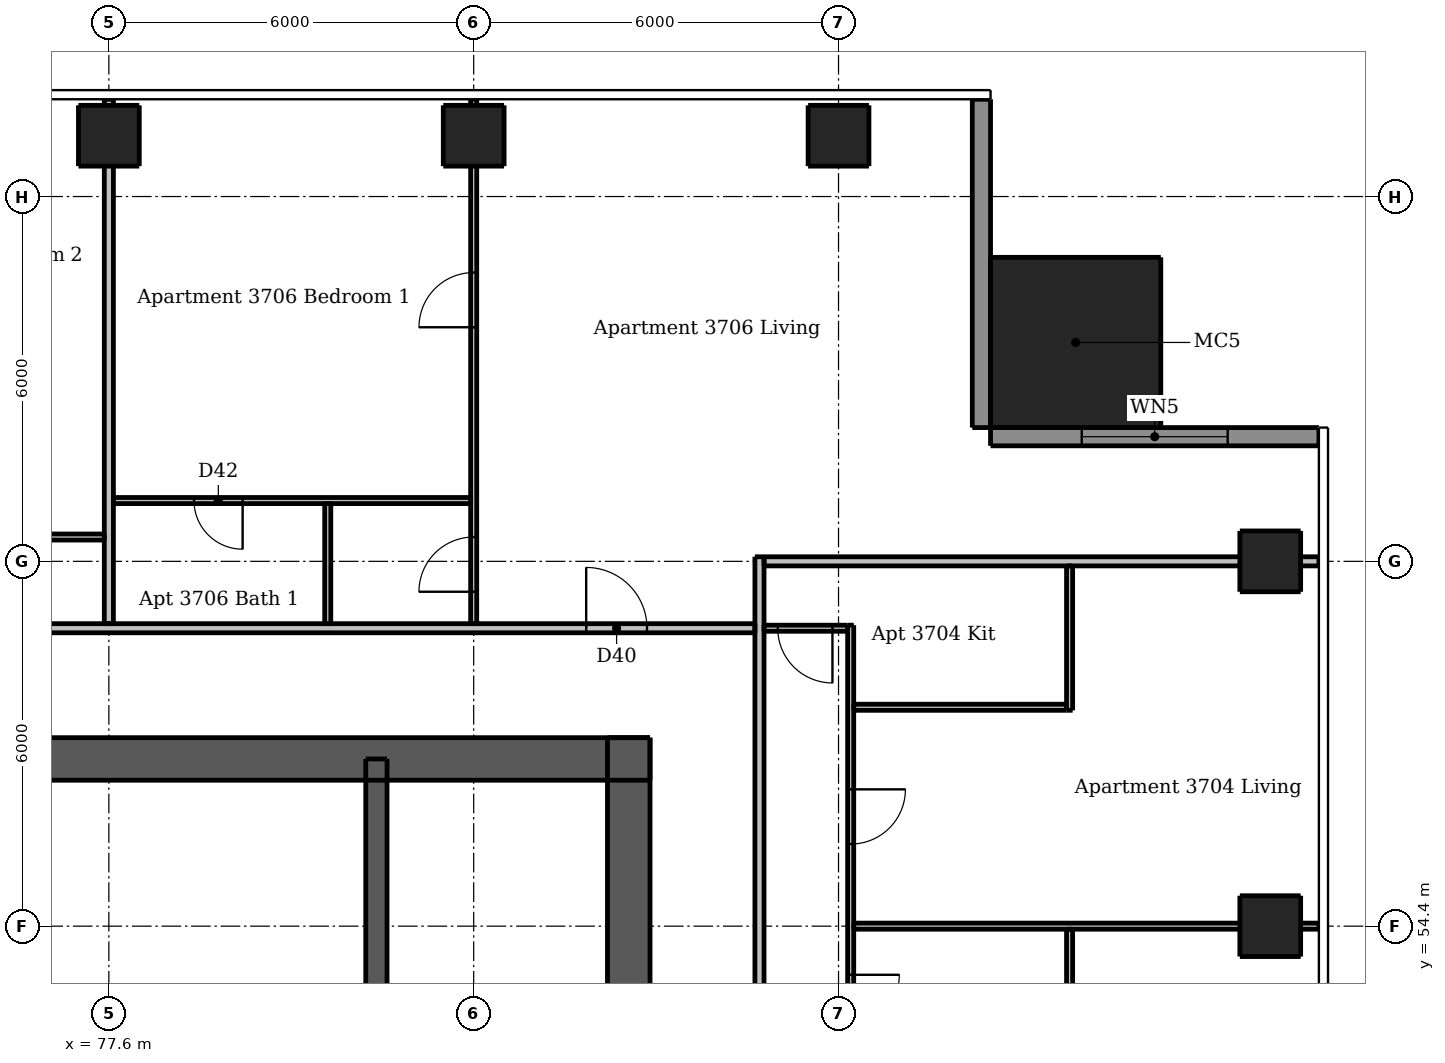
"""IFC4 building model, lengths in metres.
Left out: names, types, materials, properties, quantities, classifications, styles, units other than length and angle.
Written with IfcOpenShell. Run it as: python <this file> out.ifc"""

import sys

from ifc_helpers import new_model, si_unit, direction, frame, frame_2d, origin, origin_2d, place, context, subcontext, project, spatial, rectangle, extrude, element, fill, save


model = new_model("IFC4")
c1 = context("Model", 3, precision=1e-05, world=origin(), true_north=direction((0.0, 1.0)))
c2 = subcontext(c1, "Body", "Model", "MODEL_VIEW")
j1 = project(units=[si_unit("LENGTHUNIT", "METRE"), si_unit("PLANEANGLEUNIT", "RADIAN")], contexts=[c1])
p1 = place(None, origin())
s1 = spatial("IfcSite", under=j1, at=p1, CompositionType="ELEMENT")
p2 = place(p1, origin())
s2 = spatial("IfcBuilding", under=s1, at=p2, CompositionType="ELEMENT")
p3 = place(p2, frame((0.0, 0.0, 140.5)))
s3 = spatial("IfcBuildingStorey", under=s2, at=p3, CompositionType="ELEMENT", Elevation=140.5)
p4 = place(p3, frame((62.5, 57.15, 0.0), z_axis=(0.0, 0.0, 1.0), x_axis=(1.0, 0.0, 0.0)))
e1 = element("IfcWall", 1, at=p4, inside=s3, PredefinedType="SHEAR", context=c2, shape_type="SweptSolid", body=[
    extrude(rectangle(XDim=24.0, YDim=0.7, at=frame_2d((12.0, 0.0))), origin(), (0.0, 0.0, 1.0), 3.05),
])
p5 = place(p4, frame((20.938, 0.0, 0.0)))
e2 = element("IfcOpeningElement", 2, at=p5, cuts=e1, PredefinedType="OPENING", context=c2, shape_type="SweptSolid", body=[
    extrude(rectangle(XDim=1.1, YDim=2.1, at=frame_2d((0.55, 1.05))), frame((0.0, 0.36, 0.0), z_axis=(0.0, -1.0, 0.0), x_axis=(1.0, 0.0, 0.0)), (0.0, 0.0, 1.0), 0.72),
])
p6 = place(p4, frame((1.962, 0.0, 0.0)))
e3 = element("IfcOpeningElement", 3, at=p6, cuts=e1, PredefinedType="OPENING", context=c2, shape_type="SweptSolid", body=[
    extrude(rectangle(XDim=1.1, YDim=2.1, at=frame_2d((0.55, 1.05))), frame((0.0, 0.36, 0.0), z_axis=(0.0, -1.0, 0.0), x_axis=(1.0, 0.0, 0.0)), (0.0, 0.0, 1.0), 0.72),
])
p7 = place(p4, frame((6.423, 0.0, 0.0)))
e4 = element("IfcOpeningElement", 4, at=p7, cuts=e1, PredefinedType="OPENING", context=c2, shape_type="SweptSolid", body=[
    extrude(rectangle(XDim=0.9, YDim=2.1, at=frame_2d((0.45, 1.05))), frame((0.0, 0.36, 0.0), z_axis=(0.0, -1.0, 0.0), x_axis=(1.0, 0.0, 0.0)), (0.0, 0.0, 1.0), 0.72),
])
p8 = place(p4, frame((13.748, 0.0, 0.0)))
e5 = element("IfcOpeningElement", 5, at=p8, cuts=e1, PredefinedType="OPENING", context=c2, shape_type="SweptSolid", body=[
    extrude(rectangle(XDim=0.9, YDim=2.1, at=frame_2d((0.45, 1.05))), frame((0.0, 0.36, 0.0), z_axis=(0.0, -1.0, 0.0), x_axis=(1.0, 0.0, 0.0)), (0.0, 0.0, 1.0), 0.72),
])
p9 = place(p3, frame((86.15, 33.5, 0.0), z_axis=(0.0, 0.0, 1.0), x_axis=(0.0, 1.0, 0.0)))
e6 = element("IfcWall", 6, at=p9, inside=s3, PredefinedType="SHEAR", context=c2, shape_type="SweptSolid", body=[
    extrude(rectangle(XDim=24.0, YDim=0.7, at=frame_2d((12.0, 0.0))), origin(), (0.0, 0.0, 1.0), 3.05),
])
p10 = place(p9, frame((11.2, 0.0, 0.0)))
e7 = element("IfcOpeningElement", 7, at=p10, cuts=e6, PredefinedType="OPENING", context=c2, shape_type="SweptSolid", body=[
    extrude(rectangle(XDim=1.6, YDim=2.1, at=frame_2d((0.8, 1.05))), frame((0.0, 0.36, 0.0), z_axis=(0.0, -1.0, 0.0), x_axis=(1.0, 0.0, 0.0)), (0.0, 0.0, 1.0), 0.72),
])
p11 = place(p3, frame((82.0, 47.1, 0.0), z_axis=(0.0, 0.0, 1.0), x_axis=(0.0, 1.0, 0.0)))
e8 = element("IfcWall", 8, at=p11, inside=s3, PredefinedType="SHEAR", context=c2, shape_type="SweptSolid", body=[
    extrude(rectangle(XDim=10.05, YDim=0.35, at=frame_2d((5.025, 0.0))), origin(), (0.0, 0.0, 1.0), 3.05),
])
for number, where, z_axis, x_axis in (
    (9, (96.7, 54.4, 0.0), (0.0, 0.0, 1.0), (1.0, 0.0, 0.0)),
    (10, (96.7, 60.4, 0.0), (0.0, 0.0, 1.0), (1.0, 0.0, 0.0)),
    (11, (77.6, 67.4, 0.0), (0.0, 0.0, 1.0), (1.0, 0.0, 0.0)),
    (12, (83.6, 67.4, 0.0), (0.0, 0.0, 1.0), (1.0, 0.0, 0.0)),
    (13, (89.6, 67.4, 0.0), (0.0, 0.0, 1.0), (1.0, 0.0, 0.0)),
):
    element("IfcColumn", number, at=place(p3, frame(where, z_axis=z_axis, x_axis=x_axis)), inside=s3, PredefinedType="COLUMN", context=c2, shape_type="SweptSolid", body=[
        extrude(rectangle(XDim=1.0, YDim=1.0, at=origin_2d()), origin(), (0.0, 0.0, 1.0), 3.05),
    ])
p12 = place(p3, frame((93.5, 64.0, 0.0), z_axis=(0.0, 0.0, 1.0), x_axis=(1.0, 0.0, 0.0)))
e14 = element("IfcColumn", 14, at=p12, inside=s3, PredefinedType="COLUMN", context=c2, shape_type="SweptSolid", body=[
    extrude(rectangle(XDim=2.8, YDim=2.8, at=origin_2d()), origin(), (0.0, 0.0, 1.0), 3.3),
])
p13 = place(p3, frame((97.5, 62.45, 0.0), z_axis=(0.0, 0.0, 1.0), x_axis=(-1.0, 0.0, 0.0)))
e15 = element("IfcWall", 15, at=p13, inside=s3, PredefinedType="SOLIDWALL", context=c2, shape_type="SweptSolid", body=[
    extrude(rectangle(XDim=5.4, YDim=0.3, at=frame_2d((2.7, 0.0))), origin(), (0.0, 0.0, 1.0), 3.05),
])
p14 = place(p13, frame((1.5, 0.0, 0.15)))
e16 = element("IfcOpeningElement", 16, at=p14, cuts=e15, PredefinedType="OPENING", context=c2, shape_type="SweptSolid", body=[
    extrude(rectangle(XDim=2.4, YDim=2.1, at=frame_2d((1.2, 1.05))), frame((0.0, 0.16, 0.0), z_axis=(0.0, -1.0, 0.0), x_axis=(1.0, 0.0, 0.0)), (0.0, 0.0, 1.0), 0.32),
])
p15 = place(p3, frame((91.95, 62.6, 0.0), z_axis=(0.0, 0.0, 1.0), x_axis=(0.0, 1.0, 0.0)))
e17 = element("IfcWall", 17, at=p15, inside=s3, PredefinedType="SOLIDWALL", context=c2, shape_type="SweptSolid", body=[
    extrude(rectangle(XDim=5.4, YDim=0.3, at=frame_2d((2.7, 0.0))), origin(), (0.0, 0.0, 1.0), 3.05),
])
p16 = place(p3, frame((81.2, 59.375, 0.0), z_axis=(0.0, 0.0, 1.0), x_axis=(0.0, 1.0, 0.0)))
e18 = element("IfcWall", 18, at=p16, inside=s3, PredefinedType="PARTITIONING", context=c2, shape_type="SweptSolid", body=[
    extrude(rectangle(XDim=1.975, YDim=0.1, at=frame_2d((0.988, 0.0))), origin(), (0.0, 0.0, 1.0), 3.05),
])
p17 = place(p3, frame((83.6, 59.375, 0.0), z_axis=(0.0, 0.0, 1.0), x_axis=(0.0, 1.0, 0.0)))
e19 = element("IfcWall", 19, at=p17, inside=s3, PredefinedType="PARTITIONING", context=c2, shape_type="SweptSolid", body=[
    extrude(rectangle(XDim=8.625, YDim=0.1, at=frame_2d((4.312, 0.0))), origin(), (0.0, 0.0, 1.0), 2.516),
])
p18 = place(p17, frame((0.525, 0.0, 0.0)))
e20 = element("IfcOpeningElement", 20, at=p18, cuts=e19, PredefinedType="OPENING", context=c2, shape_type="SweptSolid", body=[
    extrude(rectangle(XDim=0.9, YDim=2.1, at=frame_2d((0.45, 1.05))), frame((0.0, 0.06, 0.0), z_axis=(0.0, -1.0, 0.0), x_axis=(1.0, 0.0, 0.0)), (0.0, 0.0, 1.0), 0.12),
])
p19 = place(p17, frame((4.875, 0.0, 0.0)))
e21 = element("IfcOpeningElement", 21, at=p19, cuts=e19, PredefinedType="OPENING", context=c2, shape_type="SweptSolid", body=[
    extrude(rectangle(XDim=0.9, YDim=2.1, at=frame_2d((0.45, 1.05))), frame((0.0, 0.06, 0.0), z_axis=(0.0, -1.0, 0.0), x_axis=(1.0, 0.0, 0.0)), (0.0, 0.0, 1.0), 0.12),
])
p20 = place(p3, frame((89.8, 59.35, 0.0), z_axis=(0.0, 0.0, 1.0), x_axis=(0.0, -1.0, 0.0)))
e22 = element("IfcWall", 22, at=p20, inside=s3, PredefinedType="PARTITIONING", context=c2, shape_type="SweptSolid", body=[
    extrude(rectangle(XDim=19.775, YDim=0.1, at=frame_2d((9.888, 0.0))), origin(), (0.0, 0.0, 1.0), 3.05),
])
p21 = place(p20, frame((2.7, 0.0, 0.0)))
e23 = element("IfcOpeningElement", 23, at=p21, cuts=e22, PredefinedType="OPENING", context=c2, shape_type="SweptSolid", body=[
    extrude(rectangle(XDim=0.9, YDim=2.1, at=frame_2d((0.45, 1.05))), frame((0.0, 0.06, 0.0), z_axis=(0.0, -1.0, 0.0), x_axis=(1.0, 0.0, 0.0)), (0.0, 0.0, 1.0), 0.12),
])
p22 = place(p20, frame((17.6, 0.0, 0.0)))
e24 = element("IfcOpeningElement", 24, at=p22, cuts=e22, PredefinedType="OPENING", context=c2, shape_type="SweptSolid", body=[
    extrude(rectangle(XDim=0.9, YDim=2.1, at=frame_2d((0.45, 1.05))), frame((0.0, 0.06, 0.0), z_axis=(0.0, -1.0, 0.0), x_axis=(1.0, 0.0, 0.0)), (0.0, 0.0, 1.0), 0.12),
])
p23 = place(p20, frame((10.15, 0.0, 0.0)))
e25 = element("IfcOpeningElement", 25, at=p23, cuts=e22, PredefinedType="OPENING", context=c2, shape_type="SweptSolid", body=[
    extrude(rectangle(XDim=0.9, YDim=2.1, at=frame_2d((0.45, 1.05))), frame((0.0, 0.06, 0.0), z_axis=(0.0, -1.0, 0.0), x_axis=(1.0, 0.0, 0.0)), (0.0, 0.0, 1.0), 0.12),
])
p24 = place(p20, frame((14.65, 0.0, 0.0)))
e26 = element("IfcOpeningElement", 26, at=p24, cuts=e22, PredefinedType="OPENING", context=c2, shape_type="SweptSolid", body=[
    extrude(rectangle(XDim=0.8, YDim=2.1, at=frame_2d((0.4, 1.05))), frame((0.0, 0.06, 0.0), z_axis=(0.0, -1.0, 0.0), x_axis=(1.0, 0.0, 0.0)), (0.0, 0.0, 1.0), 0.12),
])
p25 = place(p20, frame((5.75, 0.0, 0.0)))
e27 = element("IfcOpeningElement", 27, at=p25, cuts=e22, PredefinedType="OPENING", context=c2, shape_type="SweptSolid", body=[
    extrude(rectangle(XDim=0.8, YDim=2.1, at=frame_2d((0.4, 1.05))), frame((0.0, 0.06, 0.0), z_axis=(0.0, -1.0, 0.0), x_axis=(1.0, 0.0, 0.0)), (0.0, 0.0, 1.0), 0.12),
])
p26 = place(p3, frame((93.4, 51.95, 0.0), z_axis=(0.0, 0.0, 1.0), x_axis=(0.0, 1.0, 0.0)))
e28 = element("IfcWall", 28, at=p26, inside=s3, PredefinedType="PARTITIONING", context=c2, shape_type="SweptSolid", body=[
    extrude(rectangle(XDim=2.4, YDim=0.1, at=frame_2d((1.2, 0.0))), origin(), (0.0, 0.0, 1.0), 3.05),
])
p27 = place(p3, frame((93.4, 57.95, 0.0), z_axis=(0.0, 0.0, 1.0), x_axis=(0.0, 1.0, 0.0)))
e29 = element("IfcWall", 29, at=p27, inside=s3, PredefinedType="PARTITIONING", context=c2, shape_type="SweptSolid", body=[
    extrude(rectangle(XDim=2.375, YDim=0.1, at=frame_2d((1.188, 0.0))), origin(), (0.0, 0.0, 1.0), 3.05),
])
p28 = place(p3, frame((83.55, 61.4, 0.0), z_axis=(0.0, 0.0, 1.0), x_axis=(-1.0, 0.0, 0.0)))
e30 = element("IfcWall", 30, at=p28, inside=s3, PredefinedType="PARTITIONING", context=c2, shape_type="SweptSolid", body=[
    extrude(rectangle(XDim=5.875, YDim=0.1, at=frame_2d((2.938, 0.0))), origin(), (0.0, 0.0, 1.0), 3.05),
])
p29 = place(p28, frame((3.75, 0.0, 0.0)))
e31 = element("IfcOpeningElement", 31, at=p29, cuts=e30, PredefinedType="OPENING", context=c2, shape_type="SweptSolid", body=[
    extrude(rectangle(XDim=0.8, YDim=2.1, at=frame_2d((0.4, 1.05))), frame((0.0, 0.06, 0.0), z_axis=(0.0, -1.0, 0.0), x_axis=(1.0, 0.0, 0.0)), (0.0, 0.0, 1.0), 0.12),
])
p30 = place(p3, frame((60.75, 60.8, 0.0), z_axis=(0.0, 0.0, 1.0), x_axis=(1.0, 0.0, 0.0)))
e32 = element("IfcWall", 32, at=p30, inside=s3, PredefinedType="PARTITIONING", context=c2, shape_type="SweptSolid", body=[
    extrude(rectangle(XDim=16.775, YDim=0.1, at=frame_2d((8.387, 0.0))), origin(), (0.0, 0.0, 1.0), 3.05),
])
p31 = place(p30, frame((3.2, 0.0, 0.0)))
e33 = element("IfcOpeningElement", 33, at=p31, cuts=e32, PredefinedType="OPENING", context=c2, shape_type="SweptSolid", body=[
    extrude(rectangle(XDim=0.9, YDim=2.1, at=frame_2d((0.45, 1.05))), frame((0.0, 0.06, 0.0), z_axis=(0.0, -1.0, 0.0), x_axis=(1.0, 0.0, 0.0)), (0.0, 0.0, 1.0), 0.12),
])
p32 = place(p30, frame((1.1, 0.0, 0.0)))
e34 = element("IfcOpeningElement", 34, at=p32, cuts=e32, PredefinedType="OPENING", context=c2, shape_type="SweptSolid", body=[
    extrude(rectangle(XDim=0.9, YDim=2.1, at=frame_2d((0.45, 1.05))), frame((0.0, 0.06, 0.0), z_axis=(0.0, -1.0, 0.0), x_axis=(1.0, 0.0, 0.0)), (0.0, 0.0, 1.0), 0.12),
])
p33 = place(p30, frame((8.6, 0.0, 0.0)))
e35 = element("IfcOpeningElement", 35, at=p33, cuts=e32, PredefinedType="OPENING", context=c2, shape_type="SweptSolid", body=[
    extrude(rectangle(XDim=0.9, YDim=2.1, at=frame_2d((0.45, 1.05))), frame((0.0, 0.06, 0.0), z_axis=(0.0, -1.0, 0.0), x_axis=(1.0, 0.0, 0.0)), (0.0, 0.0, 1.0), 0.12),
])
p34 = place(p30, frame((14.6, 0.0, 0.0)))
e36 = element("IfcOpeningElement", 36, at=p34, cuts=e32, PredefinedType="OPENING", context=c2, shape_type="SweptSolid", body=[
    extrude(rectangle(XDim=0.9, YDim=2.1, at=frame_2d((0.45, 1.05))), frame((0.0, 0.06, 0.0), z_axis=(0.0, -1.0, 0.0), x_axis=(1.0, 0.0, 0.0)), (0.0, 0.0, 1.0), 0.12),
])
p35 = place(p30, frame((5.65, 0.0, 0.0)))
e37 = element("IfcOpeningElement", 37, at=p35, cuts=e32, PredefinedType="OPENING", context=c2, shape_type="SweptSolid", body=[
    extrude(rectangle(XDim=0.8, YDim=2.1, at=frame_2d((0.4, 1.05))), frame((0.0, 0.06, 0.0), z_axis=(0.0, -1.0, 0.0), x_axis=(1.0, 0.0, 0.0)), (0.0, 0.0, 1.0), 0.12),
])
p36 = place(p30, frame((11.65, 0.0, 0.0)))
e38 = element("IfcOpeningElement", 38, at=p36, cuts=e32, PredefinedType="OPENING", context=c2, shape_type="SweptSolid", body=[
    extrude(rectangle(XDim=0.8, YDim=2.1, at=frame_2d((0.4, 1.05))), frame((0.0, 0.06, 0.0), z_axis=(0.0, -1.0, 0.0), x_axis=(1.0, 0.0, 0.0)), (0.0, 0.0, 1.0), 0.12),
])
p37 = place(p3, frame((89.75, 59.3, 0.0), z_axis=(0.0, 0.0, 1.0), x_axis=(-1.0, 0.0, 0.0)))
e39 = element("IfcWall", 39, at=p37, inside=s3, PredefinedType="PARTITIONING", context=c2, shape_type="SweptSolid", body=[
    extrude(rectangle(XDim=1.375, YDim=0.1, at=frame_2d((0.688, 0.0))), origin(), (0.0, 0.0, 1.0), 3.05),
])
p38 = place(p37, frame((0.25, 0.0, 0.0)))
e40 = element("IfcOpeningElement", 40, at=p38, cuts=e39, PredefinedType="OPENING", context=c2, shape_type="SweptSolid", body=[
    extrude(rectangle(XDim=0.9, YDim=2.1, at=frame_2d((0.45, 1.05))), frame((0.0, 0.06, 0.0), z_axis=(0.0, -1.0, 0.0), x_axis=(1.0, 0.0, 0.0)), (0.0, 0.0, 1.0), 0.12),
])
p39 = place(p3, frame((89.85, 58.0, 0.0), z_axis=(0.0, 0.0, 1.0), x_axis=(1.0, 0.0, 0.0)))
e41 = element("IfcWall", 41, at=p39, inside=s3, PredefinedType="PARTITIONING", context=c2, shape_type="SweptSolid", body=[
    extrude(rectangle(XDim=3.5, YDim=0.1, at=frame_2d((1.75, 0.0))), origin(), (0.0, 0.0, 1.0), 3.05),
])
p40 = place(p3, frame((89.85, 54.4, 0.0), z_axis=(0.0, 0.0, 1.0), x_axis=(1.0, 0.0, 0.0)))
e42 = element("IfcWall", 42, at=p40, inside=s3, PredefinedType="PARTITIONING", context=c2, shape_type="SweptSolid", body=[
    extrude(rectangle(XDim=7.65, YDim=0.1, at=frame_2d((3.825, 0.0))), origin(), (0.0, 0.0, 1.0), 2.516),
])
p41 = place(p3, frame((77.6, 59.375, 0.0), z_axis=(0.0, 0.0, 1.0), x_axis=(0.0, 1.0, 0.0)))
e43 = element("IfcWall", 43, at=p41, inside=s3, PredefinedType="PARTITIONING", context=c2, shape_type="SweptSolid", body=[
    extrude(rectangle(XDim=8.625, YDim=0.15, at=frame_2d((4.312, 0.0))), origin(), (0.0, 0.0, 1.0), 2.516),
])
p42 = place(p3, frame((88.3, 60.475, 0.0), z_axis=(0.0, 0.0, 1.0), x_axis=(0.0, -1.0, 0.0)))
e44 = element("IfcWall", 44, at=p42, inside=s3, PredefinedType="PARTITIONING", context=c2, shape_type="SweptSolid", body=[
    extrude(rectangle(XDim=28.7, YDim=0.15, at=frame_2d((14.35, 0.0))), origin(), (0.0, 0.0, 1.0), 3.05),
])
p43 = place(p42, frame((27.425, 0.0, 0.0)))
e45 = element("IfcOpeningElement", 45, at=p43, cuts=e44, PredefinedType="OPENING", context=c2, shape_type="SweptSolid", body=[
    extrude(rectangle(XDim=1.0, YDim=2.1, at=frame_2d((0.5, 1.05))), frame((0.0, 0.085, 0.0), z_axis=(0.0, -1.0, 0.0), x_axis=(1.0, 0.0, 0.0)), (0.0, 0.0, 1.0), 0.17),
])
p44 = place(p42, frame((10.575, 0.0, 0.0)))
e46 = element("IfcOpeningElement", 46, at=p44, cuts=e44, PredefinedType="OPENING", context=c2, shape_type="SweptSolid", body=[
    extrude(rectangle(XDim=1.0, YDim=2.1, at=frame_2d((0.5, 1.05))), frame((0.0, 0.085, 0.0), z_axis=(0.0, -1.0, 0.0), x_axis=(1.0, 0.0, 0.0)), (0.0, 0.0, 1.0), 0.17),
])
p45 = place(p3, frame((88.375, 60.4, 0.0), z_axis=(0.0, 0.0, 1.0), x_axis=(1.0, 0.0, 0.0)))
e47 = element("IfcWall", 47, at=p45, inside=s3, PredefinedType="PARTITIONING", context=c2, shape_type="SweptSolid", body=[
    extrude(rectangle(XDim=9.125, YDim=0.15, at=frame_2d((4.562, 0.0))), origin(), (0.0, 0.0, 1.0), 2.647),
])
p46 = place(p3, frame((59.675, 59.3, 0.0), z_axis=(0.0, 0.0, 1.0), x_axis=(1.0, 0.0, 0.0)))
e48 = element("IfcWall", 48, at=p46, inside=s3, PredefinedType="PARTITIONING", context=c2, shape_type="SweptSolid", body=[
    extrude(rectangle(XDim=28.55, YDim=0.15, at=frame_2d((14.275, 0.0))), origin(), (0.0, 0.0, 1.0), 3.05),
])
p47 = place(p46, frame((8.975, 0.0, 0.0)))
e49 = element("IfcOpeningElement", 49, at=p47, cuts=e48, PredefinedType="OPENING", context=c2, shape_type="SweptSolid", body=[
    extrude(rectangle(XDim=1.0, YDim=2.1, at=frame_2d((0.5, 1.05))), frame((0.0, 0.085, 0.0), z_axis=(0.0, -1.0, 0.0), x_axis=(1.0, 0.0, 0.0)), (0.0, 0.0, 1.0), 0.17),
])
p48 = place(p46, frame((25.775, 0.0, 0.0)))
e50 = element("IfcOpeningElement", 50, at=p48, cuts=e48, PredefinedType="OPENING", context=c2, shape_type="SweptSolid", body=[
    extrude(rectangle(XDim=1.0, YDim=2.1, at=frame_2d((0.5, 1.05))), frame((0.0, 0.085, 0.0), z_axis=(0.0, -1.0, 0.0), x_axis=(1.0, 0.0, 0.0)), (0.0, 0.0, 1.0), 0.17),
])
p49 = place(p14, origin())
e51 = element("IfcWindow", 51, at=p49, inside=s3, PartitioningType="DOUBLE_PANEL_VERTICAL", PredefinedType="WINDOW", context=c2, shape_type="SweptSolid", body=[
    extrude(rectangle(XDim=2.4, YDim=2.1, at=frame_2d((1.2, 1.05))), frame((0.0, 0.03, 0.0), z_axis=(0.0, -1.0, 0.0), x_axis=(1.0, 0.0, 0.0)), (0.0, 0.0, 1.0), 0.06),
])
fill(e16, e51)
p50 = place(p5, origin())
e52 = element("IfcDoor", 52, at=p50, inside=s3, OperationType="SINGLE_SWING_RIGHT", PredefinedType="DOOR", context=c2, shape_type="SweptSolid", body=[
    extrude(rectangle(XDim=1.1, YDim=2.1, at=frame_2d((0.55, 1.05))), frame((0.0, -0.288, 0.0), z_axis=(0.0, -1.0, 0.0), x_axis=(1.0, 0.0, 0.0)), (0.0, 0.0, 1.0), 0.05),
])
fill(e2, e52)
p51 = place(p8, origin())
e53 = element("IfcDoor", 53, at=p51, inside=s3, OperationType="SINGLE_SWING_RIGHT", PredefinedType="DOOR", context=c2, shape_type="SweptSolid", body=[
    extrude(rectangle(XDim=0.9, YDim=2.1, at=frame_2d((0.45, 1.05))), frame((0.0, -0.288, 0.0), z_axis=(0.0, -1.0, 0.0), x_axis=(1.0, 0.0, 0.0)), (0.0, 0.0, 1.0), 0.05),
])
fill(e5, e53)
p52 = place(p21, origin())
e54 = element("IfcDoor", 54, at=p52, inside=s3, OperationType="SINGLE_SWING_LEFT", PredefinedType="DOOR", context=c2, shape_type="SweptSolid", body=[
    extrude(rectangle(XDim=0.9, YDim=2.1, at=frame_2d((0.45, 1.05))), frame((0.0, 0.025, 0.0), z_axis=(0.0, -1.0, 0.0), x_axis=(1.0, 0.0, 0.0)), (0.0, 0.0, 1.0), 0.05),
])
fill(e23, e54)
p53 = place(p38, origin())
e55 = element("IfcDoor", 55, at=p53, inside=s3, OperationType="SINGLE_SWING_LEFT", PredefinedType="DOOR", context=c2, shape_type="SweptSolid", body=[
    extrude(rectangle(XDim=0.9, YDim=2.1, at=frame_2d((0.45, 1.05))), frame((0.0, 0.025, 0.0), z_axis=(0.0, -1.0, 0.0), x_axis=(1.0, 0.0, 0.0)), (0.0, 0.0, 1.0), 0.05),
])
fill(e40, e55)
p54 = place(p25, origin())
e56 = element("IfcDoor", 56, at=p54, inside=s3, OperationType="SINGLE_SWING_LEFT", PredefinedType="DOOR", context=c2, shape_type="SweptSolid", body=[
    extrude(rectangle(XDim=0.8, YDim=2.1, at=frame_2d((0.4, 1.05))), frame((0.0, 0.025, 0.0), z_axis=(0.0, -1.0, 0.0), x_axis=(1.0, 0.0, 0.0)), (0.0, 0.0, 1.0), 0.05),
])
fill(e27, e56)
p55 = place(p48, origin())
e57 = element("IfcDoor", 57, at=p55, inside=s3, OperationType="SINGLE_SWING_LEFT", PredefinedType="DOOR", context=c2, shape_type="SweptSolid", body=[
    extrude(rectangle(XDim=1.0, YDim=2.1, at=frame_2d((0.5, 1.05))), frame((0.0, 0.025, 0.0), z_axis=(0.0, -1.0, 0.0), x_axis=(1.0, 0.0, 0.0)), (0.0, 0.0, 1.0), 0.05),
])
fill(e50, e57)
p56 = place(p18, origin())
e58 = element("IfcDoor", 58, at=p56, inside=s3, OperationType="SINGLE_SWING_LEFT", PredefinedType="DOOR", context=c2, shape_type="SweptSolid", body=[
    extrude(rectangle(XDim=0.9, YDim=2.1, at=frame_2d((0.45, 1.05))), frame((0.0, 0.025, 0.0), z_axis=(0.0, -1.0, 0.0), x_axis=(1.0, 0.0, 0.0)), (0.0, 0.0, 1.0), 0.05),
])
fill(e20, e58)
p57 = place(p19, origin())
e59 = element("IfcDoor", 59, at=p57, inside=s3, OperationType="SINGLE_SWING_LEFT", PredefinedType="DOOR", context=c2, shape_type="SweptSolid", body=[
    extrude(rectangle(XDim=0.9, YDim=2.1, at=frame_2d((0.45, 1.05))), frame((0.0, 0.025, 0.0), z_axis=(0.0, -1.0, 0.0), x_axis=(1.0, 0.0, 0.0)), (0.0, 0.0, 1.0), 0.05),
])
fill(e21, e59)
p58 = place(p29, origin())
e60 = element("IfcDoor", 60, at=p58, inside=s3, OperationType="SINGLE_SWING_LEFT", PredefinedType="DOOR", context=c2, shape_type="SweptSolid", body=[
    extrude(rectangle(XDim=0.8, YDim=2.1, at=frame_2d((0.4, 1.05))), frame((0.0, 0.025, 0.0), z_axis=(0.0, -1.0, 0.0), x_axis=(1.0, 0.0, 0.0)), (0.0, 0.0, 1.0), 0.05),
])
fill(e31, e60)
save(model, sys.argv[1])
